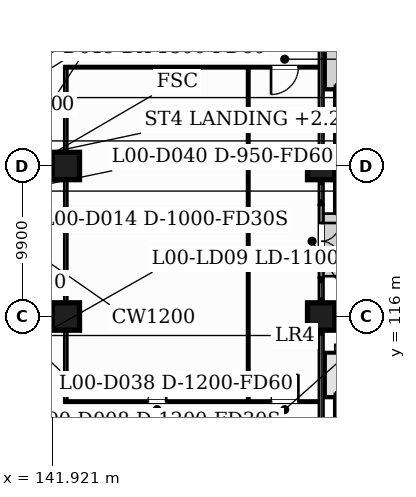
"""IFC4 building model, lengths in metres.
Left out: names, types, materials, properties, quantities, classifications, styles, units other than length and angle.
Written with IfcOpenShell. Run it as: python <this file> out.ifc"""

import sys

from ifc_helpers import new_model, si_unit, direction, frame, frame_2d, origin, origin_2d, place, context, subcontext, project, spatial, rectangle, extrude, element, fill, save


model = new_model("IFC4")
c1 = context("Model", 3, precision=1e-05, world=origin(), true_north=direction((0.0, 1.0)))
c2 = subcontext(c1, "Body", "Model", "MODEL_VIEW")
j1 = project(units=[si_unit("LENGTHUNIT", "METRE"), si_unit("PLANEANGLEUNIT", "RADIAN")], contexts=[c1])
p1 = place(None, origin())
s1 = spatial("IfcSite", under=j1, at=p1, CompositionType="ELEMENT")
p2 = place(p1, origin())
s2 = spatial("IfcBuilding", under=s1, at=p2, CompositionType="ELEMENT")
p3 = place(p2, origin())
s3 = spatial("IfcBuildingStorey", under=s2, at=p3, CompositionType="ELEMENT", Elevation=0.0)
for number, where, z_axis, x_axis in (
    (1, (142.8, 116.0, -0.35), (0.0, 0.0, 1.0), (1.0, 0.0, 0.0)),
    (2, (159.6, 116.0, -0.35), (0.0, 0.0, 1.0), (1.0, 0.0, 0.0)),
    (3, (142.8, 125.9, -0.35), (0.0, 0.0, 1.0), (1.0, 0.0, 0.0)),
    (4, (159.6, 125.9, -0.35), (0.0, 0.0, 1.0), (1.0, 0.0, 0.0)),
):
    element("IfcColumn", number, at=place(p3, frame(where, z_axis=z_axis, x_axis=x_axis)), inside=s3, PredefinedType="COLUMN", context=c2, shape_type="SweptSolid", body=[
        extrude(rectangle(XDim=1.8, YDim=1.8, at=origin_2d()), origin(), (0.0, 0.0, 1.0), 9.35),
    ])
p4 = place(p3, frame((159.6, 123.35, 0.0), z_axis=(0.0, 0.0, 1.0), x_axis=(0.0, -1.0, 0.0)))
e5 = element("IfcWall", 5, at=p4, inside=s3, PredefinedType="SOLIDWALL", context=c2, shape_type="SweptSolid", body=[
    extrude(rectangle(XDim=4.8, YDim=0.3, at=frame_2d((2.4, 0.0))), origin(), (0.0, 0.0, 1.0), 8.1),
])
p5 = place(p4, frame((1.2, 0.0, 0.0)))
e6 = element("IfcOpeningElement", 6, at=p5, cuts=e5, PredefinedType="OPENING", context=c2, shape_type="SweptSolid", body=[
    extrude(rectangle(XDim=2.4, YDim=2.4, at=frame_2d((1.2, 1.2))), frame((0.0, 0.16, 0.0), z_axis=(0.0, -1.0, 0.0), x_axis=(1.0, 0.0, 0.0)), (0.0, 0.0, 1.0), 0.32),
])
p6 = place(p3, frame((142.7, 110.4, 0.0), z_axis=(0.0, 0.0, 1.0), x_axis=(1.0, 0.0, 0.0)))
e7 = element("IfcWall", 7, at=p6, inside=s3, PredefinedType="PARTITIONING", context=c2, shape_type="SweptSolid", body=[
    extrude(rectangle(XDim=16.85, YDim=0.15, at=frame_2d((8.425, 0.0))), origin(), (0.0, 0.0, 1.0), 8.5),
])
p7 = place(p6, frame((5.5, 0.0, 0.0)))
e8 = element("IfcOpeningElement", 8, at=p7, cuts=e7, PredefinedType="OPENING", context=c2, shape_type="SweptSolid", body=[
    extrude(rectangle(XDim=1.2, YDim=2.1, at=frame_2d((0.6, 1.05))), frame((0.0, 0.085, 0.0), z_axis=(0.0, -1.0, 0.0), x_axis=(1.0, 0.0, 0.0)), (0.0, 0.0, 1.0), 0.17),
])
p8 = place(p6, frame((13.6, 0.0, 0.0)))
e9 = element("IfcOpeningElement", 9, at=p8, cuts=e7, PredefinedType="OPENING", context=c2, shape_type="SweptSolid", body=[
    extrude(rectangle(XDim=1.8, YDim=2.1, at=frame_2d((0.9, 1.05))), frame((0.0, 0.085, 0.0), z_axis=(0.0, -1.0, 0.0), x_axis=(1.0, 0.0, 0.0)), (0.0, 0.0, 1.0), 0.17),
])
p9 = place(p3, frame((142.7, 132.4, 0.0), z_axis=(0.0, 0.0, 1.0), x_axis=(1.0, 0.0, 0.0)))
e10 = element("IfcWall", 10, at=p9, inside=s3, PredefinedType="PARTITIONING", context=c2, shape_type="SweptSolid", body=[
    extrude(rectangle(XDim=16.85, YDim=0.15, at=frame_2d((8.425, 0.0))), origin(), (0.0, 0.0, 1.0), 8.5),
])
p10 = place(p9, frame((13.6, 0.0, 0.0)))
e11 = element("IfcOpeningElement", 11, at=p10, cuts=e10, PredefinedType="OPENING", context=c2, shape_type="SweptSolid", body=[
    extrude(rectangle(XDim=1.8, YDim=2.1, at=frame_2d((0.9, 1.05))), frame((0.0, 0.085, 0.0), z_axis=(0.0, -1.0, 0.0), x_axis=(1.0, 0.0, 0.0)), (0.0, 0.0, 1.0), 0.17),
])
p11 = place(p3, frame((142.8, 110.475, 0.0), z_axis=(0.0, 0.0, 1.0), x_axis=(0.0, 1.0, 0.0)))
e12 = element("IfcWall", 12, at=p11, inside=s3, PredefinedType="PARTITIONING", context=c2, shape_type="SweptSolid", body=[
    extrude(rectangle(XDim=21.85, YDim=0.2, at=frame_2d((10.925, 0.0))), origin(), (0.0, 0.0, 1.0), 8.5),
])
p12 = place(p3, frame((154.8, 110.475, 0.0), z_axis=(0.0, 0.0, 1.0), x_axis=(0.0, 1.0, 0.0)))
e13 = element("IfcWall", 13, at=p12, inside=s3, PredefinedType="PARTITIONING", context=c2, shape_type="SweptSolid", body=[
    extrude(rectangle(XDim=21.85, YDim=0.15, at=frame_2d((10.925, 0.0))), origin(), (0.0, 0.0, 1.0), 8.5),
])
p13 = place(p5, origin())
e14 = element("IfcDoor", 14, at=p13, inside=s3, OperationType="DOUBLE_DOOR_DOUBLE_SWING", PredefinedType="DOOR", context=c2, shape_type="SweptSolid", body=[
    extrude(rectangle(XDim=2.4, YDim=2.4, at=frame_2d((1.2, 1.2))), frame((0.0, 0.025, 0.0), z_axis=(0.0, -1.0, 0.0), x_axis=(1.0, 0.0, 0.0)), (0.0, 0.0, 1.0), 0.05),
])
fill(e6, e14)
p14 = place(p7, origin())
e15 = element("IfcDoor", 15, at=p14, inside=s3, OperationType="SINGLE_SWING_RIGHT", PredefinedType="DOOR", context=c2, shape_type="SweptSolid", body=[
    extrude(rectangle(XDim=1.2, YDim=2.1, at=frame_2d((0.6, 1.05))), frame((0.0, 0.025, 0.0), z_axis=(0.0, -1.0, 0.0), x_axis=(1.0, 0.0, 0.0)), (0.0, 0.0, 1.0), 0.05),
])
fill(e8, e15)
p15 = place(p8, origin())
e16 = element("IfcDoor", 16, at=p15, inside=s3, OperationType="SINGLE_SWING_RIGHT", PredefinedType="DOOR", context=c2, shape_type="SweptSolid", body=[
    extrude(rectangle(XDim=1.8, YDim=2.1, at=frame_2d((0.9, 1.05))), frame((0.0, 0.025, 0.0), z_axis=(0.0, -1.0, 0.0), x_axis=(1.0, 0.0, 0.0)), (0.0, 0.0, 1.0), 0.05),
])
fill(e9, e16)
p16 = place(p10, origin())
e17 = element("IfcDoor", 17, at=p16, inside=s3, OperationType="SINGLE_SWING_LEFT", PredefinedType="DOOR", context=c2, shape_type="SweptSolid", body=[
    extrude(rectangle(XDim=1.8, YDim=2.1, at=frame_2d((0.9, 1.05))), frame((0.0, 0.025, 0.0), z_axis=(0.0, -1.0, 0.0), x_axis=(1.0, 0.0, 0.0)), (0.0, 0.0, 1.0), 0.05),
])
fill(e11, e17)
save(model, sys.argv[1])
